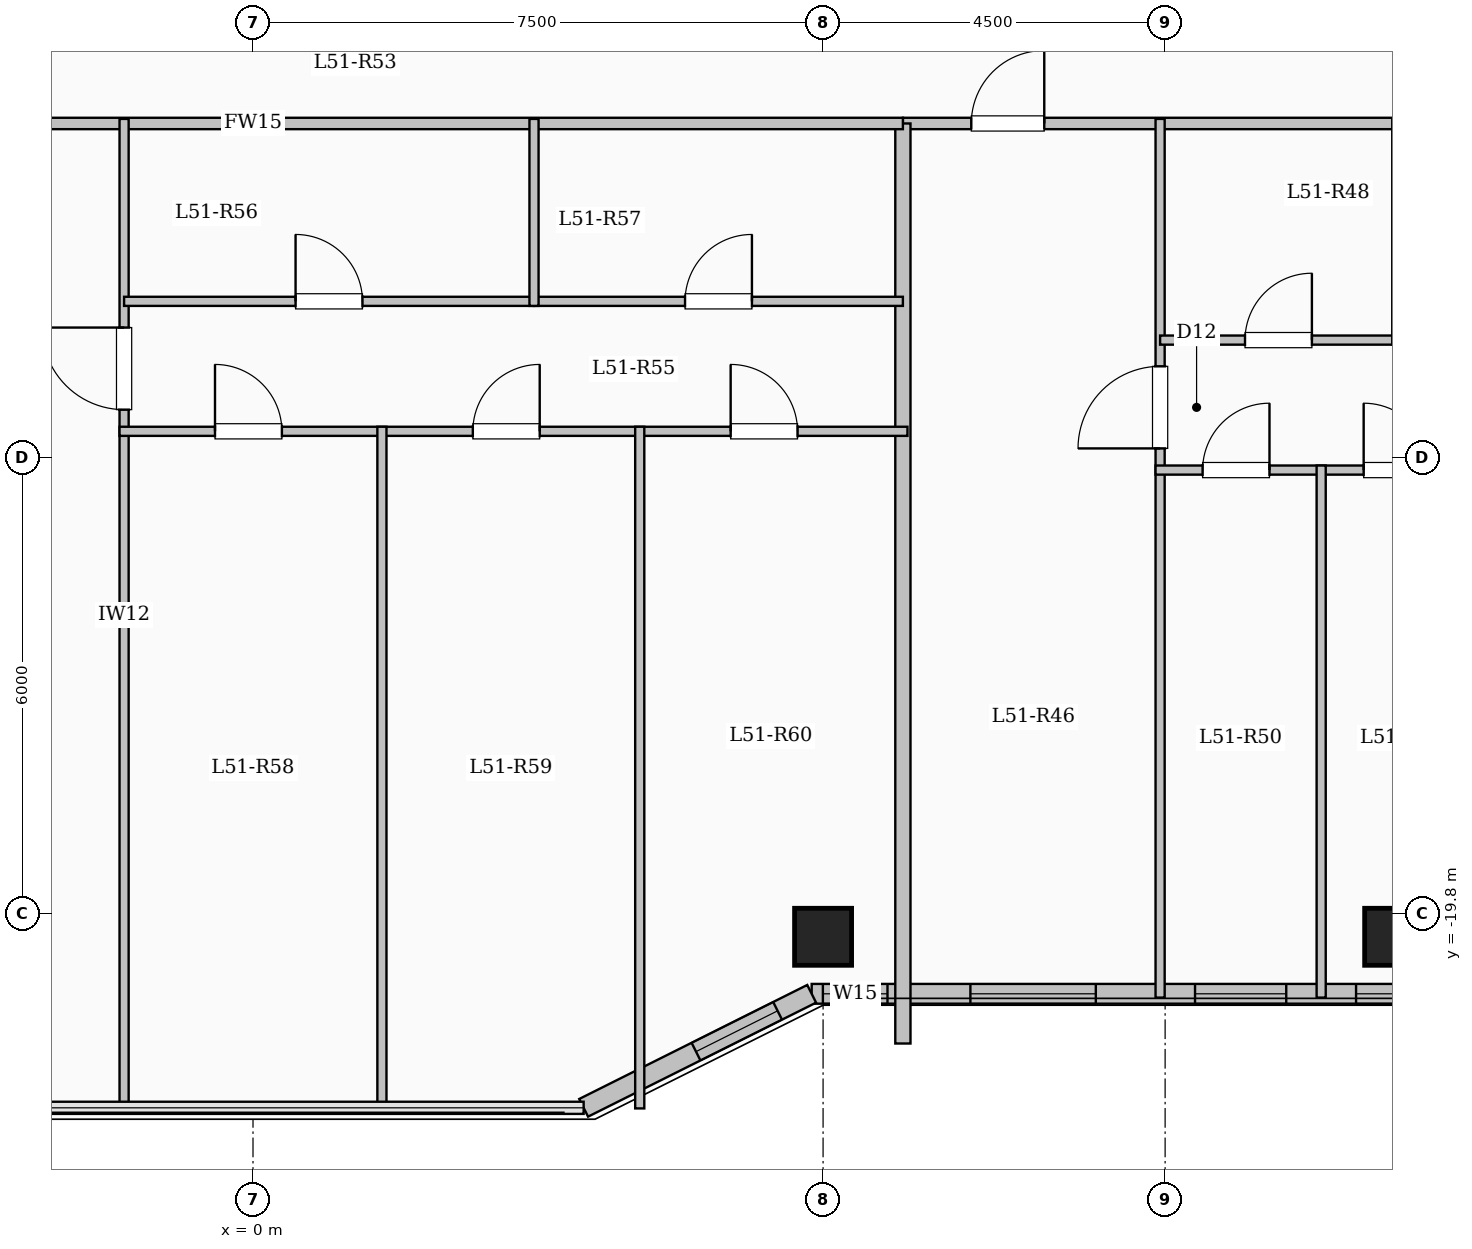
"""IFC4 building model, lengths in metres.
Left out: names, types, materials, properties, quantities, classifications, styles, units other than length and angle.
Written with IfcOpenShell. Run it as: python <this file> out.ifc"""

import sys

from ifc_helpers import new_model, si_unit, direction, frame, frame_2d, origin, origin_2d, place, context, subcontext, project, spatial, rectangle, extrude, element, fill, save


model = new_model("IFC4")
c1 = context("Model", 3, precision=1e-05, world=origin(), true_north=direction((0.0, 1.0)))
c2 = subcontext(c1, "Body", "Model", "MODEL_VIEW")
j1 = project(units=[si_unit("LENGTHUNIT", "METRE"), si_unit("PLANEANGLEUNIT", "RADIAN")], contexts=[c1])
p1 = place(None, origin())
s1 = spatial("IfcSite", under=j1, at=p1, CompositionType="ELEMENT")
p2 = place(p1, origin())
s2 = spatial("IfcBuilding", under=s1, at=p2, CompositionType="ELEMENT")
p3 = place(p2, frame((0.0, 0.0, 190.25)))
s3 = spatial("IfcBuildingStorey", under=s2, at=p3, CompositionType="ELEMENT", Elevation=190.25)
for number, where, z_axis, x_axis in (
    (1, (7.5, -20.1, 0.0), (0.0, 0.0, 1.0), (1.0, 0.0, 0.0)),
    (2, (15.0, -20.1, 0.0), (0.0, 0.0, 1.0), (1.0, 0.0, 0.0)),
):
    element("IfcColumn", number, at=place(p3, frame(where, z_axis=z_axis, x_axis=x_axis)), inside=s3, PredefinedType="COLUMN", context=c2, shape_type="SweptSolid", body=[
        extrude(rectangle(XDim=0.75, YDim=0.75, at=origin_2d()), origin(), (0.0, 0.0, 1.0), 3.35),
    ])
p4 = place(p3, frame((18.45, -20.85, 0.0), z_axis=(0.0, 0.0, 1.0), x_axis=(-1.0, 0.0, 0.0)))
e3 = element("IfcWall", 3, at=p4, inside=s3, PredefinedType="SOLIDWALL", context=c2, shape_type="SweptSolid", body=[
    extrude(rectangle(XDim=11.1, YDim=0.26, at=frame_2d((5.55, 0.0))), origin(), (0.0, 0.0, 1.0), 3.1),
])
p5 = place(p4, frame((0.56, 0.0, 0.95)))
e4 = element("IfcOpeningElement", 4, at=p5, cuts=e3, PredefinedType="OPENING", context=c2, shape_type="SweptSolid", body=[
    extrude(rectangle(XDim=1.2, YDim=1.5, at=frame_2d((0.6, 0.75))), frame((0.0, 0.14, 0.0), z_axis=(0.0, -1.0, 0.0), x_axis=(1.0, 0.0, 0.0)), (0.0, 0.0, 1.0), 0.28),
])
p6 = place(p4, frame((2.738, 0.0, 0.95)))
e5 = element("IfcOpeningElement", 5, at=p6, cuts=e3, PredefinedType="OPENING", context=c2, shape_type="SweptSolid", body=[
    extrude(rectangle(XDim=1.2, YDim=1.5, at=frame_2d((0.6, 0.75))), frame((0.0, 0.14, 0.0), z_axis=(0.0, -1.0, 0.0), x_axis=(1.0, 0.0, 0.0)), (0.0, 0.0, 1.0), 0.28),
])
p7 = place(p4, frame((4.856, 0.0, 0.95)))
e6 = element("IfcOpeningElement", 6, at=p7, cuts=e3, PredefinedType="OPENING", context=c2, shape_type="SweptSolid", body=[
    extrude(rectangle(XDim=1.2, YDim=1.5, at=frame_2d((0.6, 0.75))), frame((0.0, 0.14, 0.0), z_axis=(0.0, -1.0, 0.0), x_axis=(1.0, 0.0, 0.0)), (0.0, 0.0, 1.0), 0.28),
])
p8 = place(p4, frame((7.362, 0.0, 0.9)))
e7 = element("IfcOpeningElement", 7, at=p8, cuts=e3, PredefinedType="OPENING", context=c2, shape_type="SweptSolid", body=[
    extrude(rectangle(XDim=1.65, YDim=1.6, at=frame_2d((0.825, 0.8))), frame((0.0, 0.14, 0.0), z_axis=(0.0, -1.0, 0.0), x_axis=(1.0, 0.0, 0.0)), (0.0, 0.0, 1.0), 0.28),
])
p9 = place(p4, frame((10.103, 0.0, 0.95)))
e8 = element("IfcOpeningElement", 8, at=p9, cuts=e3, PredefinedType="OPENING", context=c2, shape_type="SweptSolid", body=[
    extrude(rectangle(XDim=0.85, YDim=1.5, at=frame_2d((0.425, 0.75))), frame((0.0, 0.14, 0.0), z_axis=(0.0, -1.0, 0.0), x_axis=(1.0, 0.0, 0.0)), (0.0, 0.0, 1.0), 0.28),
])
p10 = place(p3, frame((7.35, -20.85, 0.0), z_axis=(0.0, 0.0, 1.0), x_axis=(-0.894427191, -0.4472135955, 0.0)))
e9 = element("IfcWall", 9, at=p10, inside=s3, PredefinedType="SOLIDWALL", context=c2, shape_type="SweptSolid", body=[
    extrude(rectangle(XDim=3.354, YDim=0.26, at=frame_2d((1.677, 0.0))), origin(), (0.0, 0.0, 1.0), 3.1),
])
p11 = place(p10, frame((0.501, 0.0, 0.95)))
e10 = element("IfcOpeningElement", 10, at=p11, cuts=e9, PredefinedType="OPENING", context=c2, shape_type="SweptSolid", body=[
    extrude(rectangle(XDim=1.2, YDim=1.5, at=frame_2d((0.6, 0.75))), frame((0.0, 0.14, 0.0), z_axis=(0.0, -1.0, 0.0), x_axis=(1.0, 0.0, 0.0)), (0.0, 0.0, 1.0), 0.28),
])
p12 = place(p3, frame((8.55, -9.4, 0.0), z_axis=(0.0, 0.0, 1.0), x_axis=(1.0, 0.0, 0.0)))
e11 = element("IfcWall", 11, at=p12, inside=s3, PredefinedType="PARTITIONING", context=c2, shape_type="SweptSolid", body=[
    extrude(rectangle(XDim=9.8, YDim=0.15, at=frame_2d((4.9, 0.0))), origin(), (0.0, 0.0, 1.0), 3.1),
])
p13 = place(p12, frame((0.9, 0.0, 0.0)))
e12 = element("IfcOpeningElement", 12, at=p13, cuts=e11, PredefinedType="OPENING", context=c2, shape_type="SweptSolid", body=[
    extrude(rectangle(XDim=0.96, YDim=2.15, at=frame_2d((0.48, 1.075))), frame((0.0, 0.085, 0.0), z_axis=(0.0, -1.0, 0.0), x_axis=(1.0, 0.0, 0.0)), (0.0, 0.0, 1.0), 0.17),
])
p14 = place(p3, frame((11.934, -20.9, 0.0), z_axis=(0.0, 0.0, 1.0), x_axis=(0.0, 1.0, 0.0)))
e13 = element("IfcWall", 13, at=p14, inside=s3, PredefinedType="PARTITIONING", context=c2, shape_type="SweptSolid", body=[
    extrude(rectangle(XDim=11.56, YDim=0.12, at=frame_2d((5.78, 0.0))), origin(), (0.0, 0.0, 1.0), 3.1),
])
p15 = place(p14, frame((7.225, 0.0, 0.0)))
e14 = element("IfcOpeningElement", 14, at=p15, cuts=e13, PredefinedType="OPENING", context=c2, shape_type="SweptSolid", body=[
    extrude(rectangle(XDim=1.08, YDim=2.15, at=frame_2d((0.54, 1.075))), frame((0.0, 0.07, 0.0), z_axis=(0.0, -1.0, 0.0), x_axis=(1.0, 0.0, 0.0)), (0.0, 0.0, 1.0), 0.14),
])
p16 = place(p3, frame((11.934, -12.25, 0.0), z_axis=(0.0, 0.0, 1.0), x_axis=(1.0, 0.0, 0.0)))
e15 = element("IfcWall", 15, at=p16, inside=s3, PredefinedType="PARTITIONING", context=c2, shape_type="SweptSolid", body=[
    extrude(rectangle(XDim=3.114, YDim=0.12, at=frame_2d((1.557, 0.0))), origin(), (0.0, 0.0, 1.0), 2.725),
])
p17 = place(p16, frame((1.117, 0.0, 0.0)))
e16 = element("IfcOpeningElement", 16, at=p17, cuts=e15, PredefinedType="OPENING", context=c2, shape_type="SweptSolid", body=[
    extrude(rectangle(XDim=0.88, YDim=2.1, at=frame_2d((0.44, 1.05))), frame((0.0, 0.07, 0.0), z_axis=(0.0, -1.0, 0.0), x_axis=(1.0, 0.0, 0.0)), (0.0, 0.0, 1.0), 0.14),
])
p18 = place(p3, frame((11.874, -13.96, 0.0), z_axis=(0.0, 0.0, 1.0), x_axis=(1.0, 0.0, 0.0)))
e17 = element("IfcWall", 17, at=p18, inside=s3, PredefinedType="PARTITIONING", context=c2, shape_type="SweptSolid", body=[
    extrude(rectangle(XDim=6.536, YDim=0.12, at=frame_2d((3.268, 0.0))), origin(), (0.0, 0.0, 1.0), 2.725),
])
p19 = place(p18, frame((0.619, 0.0, 0.0)))
e18 = element("IfcOpeningElement", 18, at=p19, cuts=e17, PredefinedType="OPENING", context=c2, shape_type="SweptSolid", body=[
    extrude(rectangle(XDim=0.88, YDim=2.1, at=frame_2d((0.44, 1.05))), frame((0.0, 0.07, 0.0), z_axis=(0.0, -1.0, 0.0), x_axis=(1.0, 0.0, 0.0)), (0.0, 0.0, 1.0), 0.14),
])
p20 = place(p18, frame((2.738, 0.0, 0.0)))
e19 = element("IfcOpeningElement", 19, at=p20, cuts=e17, PredefinedType="OPENING", context=c2, shape_type="SweptSolid", body=[
    extrude(rectangle(XDim=0.88, YDim=2.1, at=frame_2d((0.44, 1.05))), frame((0.0, 0.07, 0.0), z_axis=(0.0, -1.0, 0.0), x_axis=(1.0, 0.0, 0.0)), (0.0, 0.0, 1.0), 0.14),
])
p21 = place(p18, frame((4.857, 0.0, 0.0)))
e20 = element("IfcOpeningElement", 20, at=p21, cuts=e17, PredefinedType="OPENING", context=c2, shape_type="SweptSolid", body=[
    extrude(rectangle(XDim=0.88, YDim=2.1, at=frame_2d((0.44, 1.05))), frame((0.0, 0.07, 0.0), z_axis=(0.0, -1.0, 0.0), x_axis=(1.0, 0.0, 0.0)), (0.0, 0.0, 1.0), 0.14),
])
p22 = place(p3, frame((15.048, -12.31, 0.0), z_axis=(0.0, 0.0, 1.0), x_axis=(0.0, 1.0, 0.0)))
e21 = element("IfcWall", 21, at=p22, inside=s3, PredefinedType="PARTITIONING", context=c2, shape_type="SweptSolid", body=[
    extrude(rectangle(XDim=2.97, YDim=0.12, at=frame_2d((1.485, 0.0))), origin(), (0.0, 0.0, 1.0), 2.585),
])
p23 = place(p3, frame((14.053, -20.9, 0.0), z_axis=(0.0, 0.0, 1.0), x_axis=(0.0, 1.0, 0.0)))
e22 = element("IfcWall", 22, at=p23, inside=s3, PredefinedType="PARTITIONING", context=c2, shape_type="SweptSolid", body=[
    extrude(rectangle(XDim=7.0, YDim=0.12, at=frame_2d((3.5, 0.0))), origin(), (0.0, 0.0, 1.0), 3.1),
])
p24 = place(p3, frame((8.55, -21.504, 0.0), z_axis=(0.0, 0.0, 1.0), x_axis=(0.0, 1.0, 0.0)))
e23 = element("IfcWall", 23, at=p24, inside=s3, PredefinedType="SOLIDWALL", context=c2, shape_type="SweptSolid", body=[
    extrude(rectangle(XDim=12.104, YDim=0.2, at=frame_2d((6.052, 0.0))), origin(), (0.0, 0.0, 1.0), 3.1),
])
p25 = place(p3, frame((-8.55, -9.4, 0.0), z_axis=(0.0, 0.0, 1.0), x_axis=(1.0, 0.0, 0.0)))
e24 = element("IfcWall", 24, at=p25, inside=s3, PredefinedType="PARTITIONING", context=c2, shape_type="SweptSolid", body=[
    extrude(rectangle(XDim=17.1, YDim=0.15, at=frame_2d((8.55, 0.0))), origin(), (0.0, 0.0, 1.0), 3.1),
])
p26 = place(p25, frame((1.9, 0.0, 0.0)))
e25 = element("IfcOpeningElement", 25, at=p26, cuts=e24, PredefinedType="OPENING", context=c2, shape_type="SweptSolid", body=[
    extrude(rectangle(XDim=0.96, YDim=2.15, at=frame_2d((0.48, 1.075))), frame((0.0, 0.085, 0.0), z_axis=(0.0, -1.0, 0.0), x_axis=(1.0, 0.0, 0.0)), (0.0, 0.0, 1.0), 0.17),
])
p27 = place(p3, frame((-1.696, -22.38, 0.0), z_axis=(0.0, 0.0, 1.0), x_axis=(0.0, 1.0, 0.0)))
e26 = element("IfcWall", 26, at=p27, inside=s3, PredefinedType="PARTITIONING", context=c2, shape_type="SweptSolid", body=[
    extrude(rectangle(XDim=13.04, YDim=0.12, at=frame_2d((6.52, 0.0))), origin(), (0.0, 0.0, 1.0), 3.1),
])
p28 = place(p27, frame((9.215, 0.0, 0.0)))
e27 = element("IfcOpeningElement", 27, at=p28, cuts=e26, PredefinedType="OPENING", context=c2, shape_type="SweptSolid", body=[
    extrude(rectangle(XDim=1.08, YDim=2.15, at=frame_2d((0.54, 1.075))), frame((0.0, 0.07, 0.0), z_axis=(0.0, -1.0, 0.0), x_axis=(1.0, 0.0, 0.0)), (0.0, 0.0, 1.0), 0.14),
])
p29 = place(p3, frame((-1.696, -11.74, 0.0), z_axis=(0.0, 0.0, 1.0), x_axis=(1.0, 0.0, 0.0)))
e28 = element("IfcWall", 28, at=p29, inside=s3, PredefinedType="PARTITIONING", context=c2, shape_type="SweptSolid", body=[
    extrude(rectangle(XDim=5.393, YDim=0.12, at=frame_2d((2.697, 0.0))), origin(), (0.0, 0.0, 1.0), 3.1),
])
p30 = place(p29, frame((2.256, 0.0, 0.0)))
e29 = element("IfcOpeningElement", 29, at=p30, cuts=e28, PredefinedType="OPENING", context=c2, shape_type="SweptSolid", body=[
    extrude(rectangle(XDim=0.88, YDim=2.1, at=frame_2d((0.44, 1.05))), frame((0.0, 0.07, 0.0), z_axis=(0.0, -1.0, 0.0), x_axis=(1.0, 0.0, 0.0)), (0.0, 0.0, 1.0), 0.14),
])
p31 = place(p3, frame((3.697, -11.74, 0.0), z_axis=(0.0, 0.0, 1.0), x_axis=(1.0, 0.0, 0.0)))
e30 = element("IfcWall", 30, at=p31, inside=s3, PredefinedType="PARTITIONING", context=c2, shape_type="SweptSolid", body=[
    extrude(rectangle(XDim=4.853, YDim=0.12, at=frame_2d((2.427, 0.0))), origin(), (0.0, 0.0, 1.0), 3.1),
])
p32 = place(p31, frame((1.987, 0.0, 0.0)))
e31 = element("IfcOpeningElement", 31, at=p32, cuts=e30, PredefinedType="OPENING", context=c2, shape_type="SweptSolid", body=[
    extrude(rectangle(XDim=0.88, YDim=2.1, at=frame_2d((0.44, 1.05))), frame((0.0, 0.07, 0.0), z_axis=(0.0, -1.0, 0.0), x_axis=(1.0, 0.0, 0.0)), (0.0, 0.0, 1.0), 0.14),
])
p33 = place(p3, frame((-1.756, -13.45, 0.0), z_axis=(0.0, 0.0, 1.0), x_axis=(1.0, 0.0, 0.0)))
e32 = element("IfcWall", 32, at=p33, inside=s3, PredefinedType="PARTITIONING", context=c2, shape_type="SweptSolid", body=[
    extrude(rectangle(XDim=10.366, YDim=0.12, at=frame_2d((5.183, 0.0))), origin(), (0.0, 0.0, 1.0), 3.1),
])
p34 = place(p33, frame((1.256, 0.0, 0.0)))
e33 = element("IfcOpeningElement", 33, at=p34, cuts=e32, PredefinedType="OPENING", context=c2, shape_type="SweptSolid", body=[
    extrude(rectangle(XDim=0.88, YDim=2.1, at=frame_2d((0.44, 1.05))), frame((0.0, 0.07, 0.0), z_axis=(0.0, -1.0, 0.0), x_axis=(1.0, 0.0, 0.0)), (0.0, 0.0, 1.0), 0.14),
])
p35 = place(p33, frame((4.648, 0.0, 0.0)))
e34 = element("IfcOpeningElement", 34, at=p35, cuts=e32, PredefinedType="OPENING", context=c2, shape_type="SweptSolid", body=[
    extrude(rectangle(XDim=0.88, YDim=2.1, at=frame_2d((0.44, 1.05))), frame((0.0, 0.07, 0.0), z_axis=(0.0, -1.0, 0.0), x_axis=(1.0, 0.0, 0.0)), (0.0, 0.0, 1.0), 0.14),
])
p36 = place(p33, frame((8.04, 0.0, 0.0)))
e35 = element("IfcOpeningElement", 35, at=p36, cuts=e32, PredefinedType="OPENING", context=c2, shape_type="SweptSolid", body=[
    extrude(rectangle(XDim=0.88, YDim=2.1, at=frame_2d((0.44, 1.05))), frame((0.0, 0.07, 0.0), z_axis=(0.0, -1.0, 0.0), x_axis=(1.0, 0.0, 0.0)), (0.0, 0.0, 1.0), 0.14),
])
p37 = place(p3, frame((3.697, -11.8, 0.0), z_axis=(0.0, 0.0, 1.0), x_axis=(0.0, 1.0, 0.0)))
e36 = element("IfcWall", 36, at=p37, inside=s3, PredefinedType="PARTITIONING", context=c2, shape_type="SweptSolid", body=[
    extrude(rectangle(XDim=2.46, YDim=0.12, at=frame_2d((1.23, 0.0))), origin(), (0.0, 0.0, 1.0), 3.1),
])
p38 = place(p3, frame((1.696, -22.38, 0.0), z_axis=(0.0, 0.0, 1.0), x_axis=(0.0, 1.0, 0.0)))
e37 = element("IfcWall", 37, at=p38, inside=s3, PredefinedType="PARTITIONING", context=c2, shape_type="SweptSolid", body=[
    extrude(rectangle(XDim=8.99, YDim=0.12, at=frame_2d((4.495, 0.0))), origin(), (0.0, 0.0, 1.0), 3.1),
])
p39 = place(p3, frame((5.088, -22.358, 0.0), z_axis=(0.0, 0.0, 1.0), x_axis=(0.0, 1.0, 0.0)))
e38 = element("IfcWall", 38, at=p39, inside=s3, PredefinedType="PARTITIONING", context=c2, shape_type="SweptSolid", body=[
    extrude(rectangle(XDim=8.968, YDim=0.12, at=frame_2d((4.484, 0.0))), origin(), (0.0, 0.0, 1.0), 3.1),
])
p40 = place(p6, origin())
e39 = element("IfcWindow", 39, at=p40, inside=s3, PartitioningType="SINGLE_PANEL", PredefinedType="WINDOW", context=c2, shape_type="SweptSolid", body=[
    extrude(rectangle(XDim=1.2, YDim=1.5, at=frame_2d((0.6, 0.75))), frame((0.0, 0.03, 0.0), z_axis=(0.0, -1.0, 0.0), x_axis=(1.0, 0.0, 0.0)), (0.0, 0.0, 1.0), 0.06),
])
fill(e5, e39)
p41 = place(p7, origin())
e40 = element("IfcWindow", 40, at=p41, inside=s3, PartitioningType="SINGLE_PANEL", PredefinedType="WINDOW", context=c2, shape_type="SweptSolid", body=[
    extrude(rectangle(XDim=1.2, YDim=1.5, at=frame_2d((0.6, 0.75))), frame((0.0, 0.03, 0.0), z_axis=(0.0, -1.0, 0.0), x_axis=(1.0, 0.0, 0.0)), (0.0, 0.0, 1.0), 0.06),
])
fill(e6, e40)
p42 = place(p8, origin())
e41 = element("IfcWindow", 41, at=p42, inside=s3, PartitioningType="SINGLE_PANEL", PredefinedType="WINDOW", context=c2, shape_type="SweptSolid", body=[
    extrude(rectangle(XDim=1.65, YDim=1.6, at=frame_2d((0.825, 0.8))), frame((0.0, 0.03, 0.0), z_axis=(0.0, -1.0, 0.0), x_axis=(1.0, 0.0, 0.0)), (0.0, 0.0, 1.0), 0.06),
])
fill(e7, e41)
p43 = place(p9, origin())
e42 = element("IfcWindow", 42, at=p43, inside=s3, PartitioningType="SINGLE_PANEL", PredefinedType="WINDOW", context=c2, shape_type="SweptSolid", body=[
    extrude(rectangle(XDim=0.85, YDim=1.5, at=frame_2d((0.425, 0.75))), frame((0.0, 0.03, 0.0), z_axis=(0.0, -1.0, 0.0), x_axis=(1.0, 0.0, 0.0)), (0.0, 0.0, 1.0), 0.06),
])
fill(e8, e42)
p44 = place(p11, origin())
e43 = element("IfcWindow", 43, at=p44, inside=s3, PartitioningType="SINGLE_PANEL", PredefinedType="WINDOW", context=c2, shape_type="SweptSolid", body=[
    extrude(rectangle(XDim=1.2, YDim=1.5, at=frame_2d((0.6, 0.75))), frame((0.0, 0.03, 0.0), z_axis=(0.0, -1.0, 0.0), x_axis=(1.0, 0.0, 0.0)), (0.0, 0.0, 1.0), 0.06),
])
fill(e10, e43)
p45 = place(p13, origin())
e44 = element("IfcDoor", 44, at=p45, inside=s3, OperationType="SINGLE_SWING_RIGHT", PredefinedType="DOOR", context=c2, shape_type="SweptSolid", body=[
    extrude(rectangle(XDim=0.96, YDim=2.15, at=frame_2d((0.48, 1.075))), frame((0.0, 0.025, 0.0), z_axis=(0.0, -1.0, 0.0), x_axis=(1.0, 0.0, 0.0)), (0.0, 0.0, 1.0), 0.05),
])
fill(e12, e44)
p46 = place(p15, origin())
e45 = element("IfcDoor", 45, at=p46, inside=s3, OperationType="SINGLE_SWING_LEFT", PredefinedType="DOOR", context=c2, shape_type="SweptSolid", body=[
    extrude(rectangle(XDim=1.08, YDim=2.15, at=frame_2d((0.54, 1.075))), frame((0.0, 0.025, 0.0), z_axis=(0.0, -1.0, 0.0), x_axis=(1.0, 0.0, 0.0)), (0.0, 0.0, 1.0), 0.05),
])
fill(e14, e45)
p47 = place(p17, origin())
e46 = element("IfcDoor", 46, at=p47, inside=s3, OperationType="SINGLE_SWING_RIGHT", PredefinedType="DOOR", context=c2, shape_type="SweptSolid", body=[
    extrude(rectangle(XDim=0.88, YDim=2.1, at=frame_2d((0.44, 1.05))), frame((0.0, 0.025, 0.0), z_axis=(0.0, -1.0, 0.0), x_axis=(1.0, 0.0, 0.0)), (0.0, 0.0, 1.0), 0.05),
])
fill(e16, e46)
p48 = place(p19, origin())
e47 = element("IfcDoor", 47, at=p48, inside=s3, OperationType="SINGLE_SWING_RIGHT", PredefinedType="DOOR", context=c2, shape_type="SweptSolid", body=[
    extrude(rectangle(XDim=0.88, YDim=2.1, at=frame_2d((0.44, 1.05))), frame((0.0, 0.025, 0.0), z_axis=(0.0, -1.0, 0.0), x_axis=(1.0, 0.0, 0.0)), (0.0, 0.0, 1.0), 0.05),
])
fill(e18, e47)
p49 = place(p20, origin())
e48 = element("IfcDoor", 48, at=p49, inside=s3, OperationType="SINGLE_SWING_LEFT", PredefinedType="DOOR", context=c2, shape_type="SweptSolid", body=[
    extrude(rectangle(XDim=0.88, YDim=2.1, at=frame_2d((0.44, 1.05))), frame((0.0, 0.025, 0.0), z_axis=(0.0, -1.0, 0.0), x_axis=(1.0, 0.0, 0.0)), (0.0, 0.0, 1.0), 0.05),
])
fill(e19, e48)
p50 = place(p28, origin())
e49 = element("IfcDoor", 49, at=p50, inside=s3, OperationType="SINGLE_SWING_RIGHT", PredefinedType="DOOR", context=c2, shape_type="SweptSolid", body=[
    extrude(rectangle(XDim=1.08, YDim=2.15, at=frame_2d((0.54, 1.075))), frame((0.0, 0.025, 0.0), z_axis=(0.0, -1.0, 0.0), x_axis=(1.0, 0.0, 0.0)), (0.0, 0.0, 1.0), 0.05),
])
fill(e27, e49)
p51 = place(p30, origin())
e50 = element("IfcDoor", 50, at=p51, inside=s3, OperationType="SINGLE_SWING_LEFT", PredefinedType="DOOR", context=c2, shape_type="SweptSolid", body=[
    extrude(rectangle(XDim=0.88, YDim=2.1, at=frame_2d((0.44, 1.05))), frame((0.0, 0.025, 0.0), z_axis=(0.0, -1.0, 0.0), x_axis=(1.0, 0.0, 0.0)), (0.0, 0.0, 1.0), 0.05),
])
fill(e29, e50)
p52 = place(p32, origin())
e51 = element("IfcDoor", 51, at=p52, inside=s3, OperationType="SINGLE_SWING_RIGHT", PredefinedType="DOOR", context=c2, shape_type="SweptSolid", body=[
    extrude(rectangle(XDim=0.88, YDim=2.1, at=frame_2d((0.44, 1.05))), frame((0.0, 0.025, 0.0), z_axis=(0.0, -1.0, 0.0), x_axis=(1.0, 0.0, 0.0)), (0.0, 0.0, 1.0), 0.05),
])
fill(e31, e51)
p53 = place(p34, origin())
e52 = element("IfcDoor", 52, at=p53, inside=s3, OperationType="SINGLE_SWING_LEFT", PredefinedType="DOOR", context=c2, shape_type="SweptSolid", body=[
    extrude(rectangle(XDim=0.88, YDim=2.1, at=frame_2d((0.44, 1.05))), frame((0.0, 0.025, 0.0), z_axis=(0.0, -1.0, 0.0), x_axis=(1.0, 0.0, 0.0)), (0.0, 0.0, 1.0), 0.05),
])
fill(e33, e52)
p54 = place(p35, origin())
e53 = element("IfcDoor", 53, at=p54, inside=s3, OperationType="SINGLE_SWING_RIGHT", PredefinedType="DOOR", context=c2, shape_type="SweptSolid", body=[
    extrude(rectangle(XDim=0.88, YDim=2.1, at=frame_2d((0.44, 1.05))), frame((0.0, 0.025, 0.0), z_axis=(0.0, -1.0, 0.0), x_axis=(1.0, 0.0, 0.0)), (0.0, 0.0, 1.0), 0.05),
])
fill(e34, e53)
p55 = place(p36, origin())
e54 = element("IfcDoor", 54, at=p55, inside=s3, OperationType="SINGLE_SWING_LEFT", PredefinedType="DOOR", context=c2, shape_type="SweptSolid", body=[
    extrude(rectangle(XDim=0.88, YDim=2.1, at=frame_2d((0.44, 1.05))), frame((0.0, 0.025, 0.0), z_axis=(0.0, -1.0, 0.0), x_axis=(1.0, 0.0, 0.0)), (0.0, 0.0, 1.0), 0.05),
])
fill(e35, e54)
save(model, sys.argv[1])
